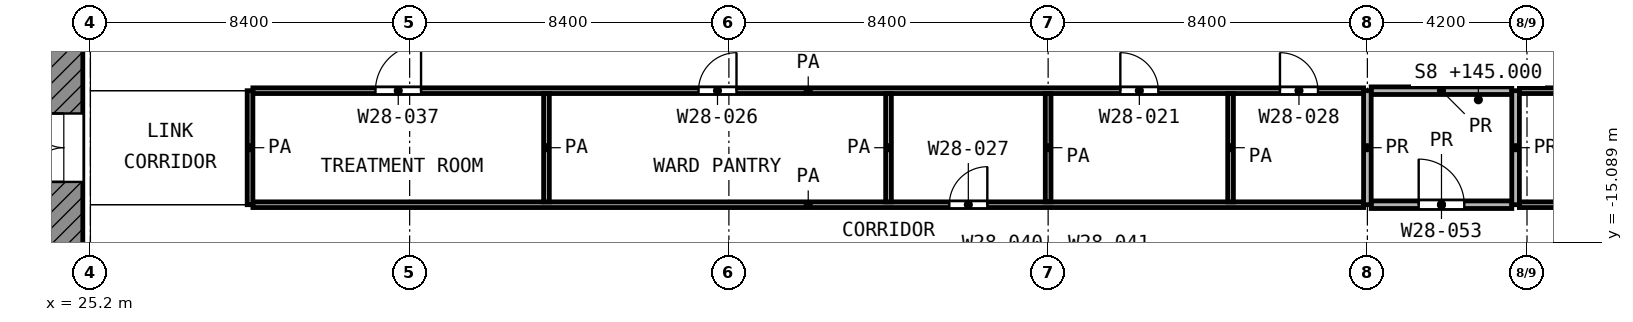
"""IFC4 building model, lengths in metres.
Left out: names, types, materials, properties, quantities, classifications, styles, units other than length and angle.
Written with IfcOpenShell. Run it as: python <this file> out.ifc"""

import sys

from ifc_helpers import new_model, si_unit, direction, frame, frame_2d, origin, place, context, subcontext, project, spatial, rectangle, extrude, element, fill, save


model = new_model("IFC4")
c1 = context("Model", 3, precision=1e-05, world=origin(), true_north=direction((0.0, 1.0)))
c2 = subcontext(c1, "Body", "Model", "MODEL_VIEW")
j1 = project(units=[si_unit("LENGTHUNIT", "METRE"), si_unit("PLANEANGLEUNIT", "RADIAN")], contexts=[c1])
p1 = place(None, origin())
s1 = spatial("IfcSite", under=j1, at=p1, CompositionType="ELEMENT")
p2 = place(p1, origin())
s2 = spatial("IfcBuilding", under=s1, at=p2, CompositionType="ELEMENT")
p3 = place(p2, frame((0.0, 0.0, 145.0)))
s3 = spatial("IfcBuildingStorey", under=s2, at=p3, CompositionType="ELEMENT", Elevation=145.0)
p4 = place(p3, frame((24.5, -24.0, 0.0), z_axis=(0.0, 0.0, 1.0), x_axis=(0.0, 1.0, 0.0)))
e1 = element("IfcWall", 1, at=p4, inside=s3, PredefinedType="SHEAR", context=c2, shape_type="SweptSolid", body=[
    extrude(rectangle(XDim=18.6, YDim=1.0, at=frame_2d((9.3, 0.0))), origin(), (0.0, 0.0, 1.0), 3.6),
])
p5 = place(p4, frame((10.5, 0.0, 0.0)))
e2 = element("IfcOpeningElement", 2, at=p5, cuts=e1, PredefinedType="OPENING", context=c2, shape_type="SweptSolid", body=[
    extrude(rectangle(XDim=1.8, YDim=2.1, at=frame_2d((0.9, 1.05))), frame((0.0, 0.51, 0.0), z_axis=(0.0, -1.0, 0.0), x_axis=(1.0, 0.0, 0.0)), (0.0, 0.0, 1.0), 1.02),
])
p6 = place(p3, frame((29.475, -14.1, 0.0), z_axis=(0.0, 0.0, 1.0), x_axis=(1.0, 0.0, 0.0)))
e3 = element("IfcWall", 3, at=p6, inside=s3, PredefinedType="PARTITIONING", context=c2, shape_type="SweptSolid", body=[
    extrude(rectangle(XDim=29.225, YDim=0.15, at=frame_2d((14.612, 0.0))), origin(), (0.0, 0.0, 1.0), 3.6),
])
p7 = place(p6, frame((18.325, 0.0, 0.0)))
e4 = element("IfcOpeningElement", 4, at=p7, cuts=e3, PredefinedType="OPENING", context=c2, shape_type="SweptSolid", body=[
    extrude(rectangle(XDim=1.0, YDim=2.1, at=frame_2d((0.5, 1.05))), frame((0.0, 0.085, 0.0), z_axis=(0.0, -1.0, 0.0), x_axis=(1.0, 0.0, 0.0)), (0.0, 0.0, 1.0), 0.17),
])
p8 = place(p3, frame((62.8, -14.1, 0.0), z_axis=(0.0, 0.0, 1.0), x_axis=(1.0, 0.0, 0.0)))
e5 = element("IfcWall", 5, at=p8, inside=s3, PredefinedType="PARTITIONING", context=c2, shape_type="SweptSolid", body=[
    extrude(rectangle(XDim=10.025, YDim=0.15, at=frame_2d((5.012, 0.0))), origin(), (0.0, 0.0, 1.0), 3.6),
])
p9 = place(p3, frame((29.475, -11.1, 0.0), z_axis=(0.0, 0.0, 1.0), x_axis=(1.0, 0.0, 0.0)))
e6 = element("IfcWall", 6, at=p9, inside=s3, PredefinedType="PARTITIONING", context=c2, shape_type="SweptSolid", body=[
    extrude(rectangle(XDim=29.225, YDim=0.15, at=frame_2d((14.612, 0.0))), origin(), (0.0, 0.0, 1.0), 3.6),
])
p10 = place(p9, frame((3.225, 0.0, 0.0)))
e7 = element("IfcOpeningElement", 7, at=p10, cuts=e6, PredefinedType="OPENING", context=c2, shape_type="SweptSolid", body=[
    extrude(rectangle(XDim=1.2, YDim=2.1, at=frame_2d((0.6, 1.05))), frame((0.0, 0.085, 0.0), z_axis=(0.0, -1.0, 0.0), x_axis=(1.0, 0.0, 0.0)), (0.0, 0.0, 1.0), 0.17),
])
p11 = place(p9, frame((11.725, 0.0, 0.0)))
e8 = element("IfcOpeningElement", 8, at=p11, cuts=e6, PredefinedType="OPENING", context=c2, shape_type="SweptSolid", body=[
    extrude(rectangle(XDim=1.0, YDim=2.1, at=frame_2d((0.5, 1.05))), frame((0.0, 0.085, 0.0), z_axis=(0.0, -1.0, 0.0), x_axis=(1.0, 0.0, 0.0)), (0.0, 0.0, 1.0), 0.17),
])
p12 = place(p9, frame((22.825, 0.0, 0.0)))
e9 = element("IfcOpeningElement", 9, at=p12, cuts=e6, PredefinedType="OPENING", context=c2, shape_type="SweptSolid", body=[
    extrude(rectangle(XDim=1.0, YDim=2.1, at=frame_2d((0.5, 1.05))), frame((0.0, 0.085, 0.0), z_axis=(0.0, -1.0, 0.0), x_axis=(1.0, 0.0, 0.0)), (0.0, 0.0, 1.0), 0.17),
])
p13 = place(p9, frame((27.025, 0.0, 0.0)))
e10 = element("IfcOpeningElement", 10, at=p13, cuts=e6, PredefinedType="OPENING", context=c2, shape_type="SweptSolid", body=[
    extrude(rectangle(XDim=1.0, YDim=2.1, at=frame_2d((0.5, 1.05))), frame((0.0, 0.085, 0.0), z_axis=(0.0, -1.0, 0.0), x_axis=(1.0, 0.0, 0.0)), (0.0, 0.0, 1.0), 0.17),
])
p14 = place(p3, frame((62.8, -11.1, 0.0), z_axis=(0.0, 0.0, 1.0), x_axis=(1.0, 0.0, 0.0)))
e11 = element("IfcWall", 11, at=p14, inside=s3, PredefinedType="PARTITIONING", context=c2, shape_type="SweptSolid", body=[
    extrude(rectangle(XDim=10.025, YDim=0.15, at=frame_2d((5.012, 0.0))), origin(), (0.0, 0.0, 1.0), 3.6),
])
p15 = place(p14, frame((4.4, 0.0, 0.0)))
e12 = element("IfcOpeningElement", 12, at=p15, cuts=e11, PredefinedType="OPENING", context=c2, shape_type="SweptSolid", body=[
    extrude(rectangle(XDim=1.2, YDim=2.1, at=frame_2d((0.6, 1.05))), frame((0.0, 0.085, 0.0), z_axis=(0.0, -1.0, 0.0), x_axis=(1.0, 0.0, 0.0)), (0.0, 0.0, 1.0), 0.17),
])
p16 = place(p3, frame((29.4, -14.1, 0.0), z_axis=(0.0, 0.0, 1.0), x_axis=(0.0, 1.0, 0.0)))
e13 = element("IfcWall", 13, at=p16, inside=s3, PredefinedType="PARTITIONING", context=c2, shape_type="SweptSolid", body=[
    extrude(rectangle(XDim=3.0, YDim=0.15, at=frame_2d((1.5, 0.0))), origin(), (0.0, 0.0, 1.0), 3.6),
])
for number, where, z_axis, x_axis in (
    (14, (37.2, -14.025, 0.0), (0.0, 0.0, 1.0), (0.0, 1.0, 0.0)),
    (15, (46.2, -14.025, 0.0), (0.0, 0.0, 1.0), (0.0, 1.0, 0.0)),
    (16, (50.4, -14.025, 0.0), (0.0, 0.0, 1.0), (0.0, 1.0, 0.0)),
    (17, (55.2, -14.025, 0.0), (0.0, 0.0, 1.0), (0.0, 1.0, 0.0)),
):
    element("IfcWall", number, at=place(p3, frame(where, z_axis=z_axis, x_axis=x_axis)), inside=s3, PredefinedType="PARTITIONING", context=c2, shape_type="SweptSolid", body=[
        extrude(rectangle(XDim=2.85, YDim=0.15, at=frame_2d((1.425, 0.0))), origin(), (0.0, 0.0, 1.0), 3.6),
    ])
p17 = place(p3, frame((58.9, -14.1, 0.0), z_axis=(0.0, 0.0, 1.0), x_axis=(1.0, 0.0, 0.0)))
e18 = element("IfcWall", 18, at=p17, inside=s3, PredefinedType="PARTITIONING", context=c2, shape_type="SweptSolid", body=[
    extrude(rectangle(XDim=3.7, YDim=0.2, at=frame_2d((1.85, 0.0))), origin(), (0.0, 0.0, 1.0), 3.6),
])
p18 = place(p17, frame((1.25, 0.0, 0.0)))
e19 = element("IfcOpeningElement", 19, at=p18, cuts=e18, PredefinedType="OPENING", context=c2, shape_type="SweptSolid", body=[
    extrude(rectangle(XDim=1.2, YDim=2.1, at=frame_2d((0.6, 1.05))), frame((0.0, 0.11, 0.0), z_axis=(0.0, -1.0, 0.0), x_axis=(1.0, 0.0, 0.0)), (0.0, 0.0, 1.0), 0.22),
])
p19 = place(p3, frame((58.9, -11.1, 0.0), z_axis=(0.0, 0.0, 1.0), x_axis=(1.0, 0.0, 0.0)))
e20 = element("IfcWall", 20, at=p19, inside=s3, PredefinedType="PARTITIONING", context=c2, shape_type="SweptSolid", body=[
    extrude(rectangle(XDim=3.7, YDim=0.2, at=frame_2d((1.85, 0.0))), origin(), (0.0, 0.0, 1.0), 3.6),
])
for number, where, z_axis, x_axis in (
    (21, (58.8, -14.1, 0.0), (0.0, 0.0, 1.0), (0.0, 1.0, 0.0)),
    (22, (62.7, -14.1, 0.0), (0.0, 0.0, 1.0), (0.0, 1.0, 0.0)),
):
    element("IfcWall", number, at=place(p3, frame(where, z_axis=z_axis, x_axis=x_axis)), inside=s3, PredefinedType="PARTITIONING", context=c2, shape_type="SweptSolid", body=[
        extrude(rectangle(XDim=3.0, YDim=0.2, at=frame_2d((1.5, 0.0))), origin(), (0.0, 0.0, 1.0), 3.6),
    ])
p20 = place(p5, origin())
e23 = element("IfcDoor", 23, at=p20, inside=s3, OperationType="DOUBLE_DOOR_SINGLE_SWING", PredefinedType="DOOR", context=c2, shape_type="SweptSolid", body=[
    extrude(rectangle(XDim=1.8, YDim=2.1, at=frame_2d((0.9, 1.05))), frame((0.0, 0.025, 0.0), z_axis=(0.0, -1.0, 0.0), x_axis=(1.0, 0.0, 0.0)), (0.0, 0.0, 1.0), 0.05),
])
fill(e2, e23)
p21 = place(p10, origin())
e24 = element("IfcDoor", 24, at=p21, inside=s3, OperationType="SINGLE_SWING_RIGHT", PredefinedType="DOOR", context=c2, shape_type="SweptSolid", body=[
    extrude(rectangle(XDim=1.2, YDim=2.1, at=frame_2d((0.6, 1.05))), frame((0.0, 0.025, 0.0), z_axis=(0.0, -1.0, 0.0), x_axis=(1.0, 0.0, 0.0)), (0.0, 0.0, 1.0), 0.05),
])
fill(e7, e24)
p22 = place(p11, origin())
e25 = element("IfcDoor", 25, at=p22, inside=s3, OperationType="SINGLE_SWING_RIGHT", PredefinedType="DOOR", context=c2, shape_type="SweptSolid", body=[
    extrude(rectangle(XDim=1.0, YDim=2.1, at=frame_2d((0.5, 1.05))), frame((0.0, 0.025, 0.0), z_axis=(0.0, -1.0, 0.0), x_axis=(1.0, 0.0, 0.0)), (0.0, 0.0, 1.0), 0.05),
])
fill(e8, e25)
p23 = place(p7, origin())
e26 = element("IfcDoor", 26, at=p23, inside=s3, OperationType="SINGLE_SWING_RIGHT", PredefinedType="DOOR", context=c2, shape_type="SweptSolid", body=[
    extrude(rectangle(XDim=1.0, YDim=2.1, at=frame_2d((0.5, 1.05))), frame((0.0, 0.025, 0.0), z_axis=(0.0, -1.0, 0.0), x_axis=(1.0, 0.0, 0.0)), (0.0, 0.0, 1.0), 0.05),
])
fill(e4, e26)
p24 = place(p12, origin())
e27 = element("IfcDoor", 27, at=p24, inside=s3, OperationType="SINGLE_SWING_LEFT", PredefinedType="DOOR", context=c2, shape_type="SweptSolid", body=[
    extrude(rectangle(XDim=1.0, YDim=2.1, at=frame_2d((0.5, 1.05))), frame((0.0, 0.025, 0.0), z_axis=(0.0, -1.0, 0.0), x_axis=(1.0, 0.0, 0.0)), (0.0, 0.0, 1.0), 0.05),
])
fill(e9, e27)
p25 = place(p13, origin())
e28 = element("IfcDoor", 28, at=p25, inside=s3, OperationType="SINGLE_SWING_LEFT", PredefinedType="DOOR", context=c2, shape_type="SweptSolid", body=[
    extrude(rectangle(XDim=1.0, YDim=2.1, at=frame_2d((0.5, 1.05))), frame((0.0, 0.025, 0.0), z_axis=(0.0, -1.0, 0.0), x_axis=(1.0, 0.0, 0.0)), (0.0, 0.0, 1.0), 0.05),
])
fill(e10, e28)
p26 = place(p18, origin())
e29 = element("IfcDoor", 29, at=p26, inside=s3, OperationType="SINGLE_SWING_LEFT", PredefinedType="DOOR", context=c2, shape_type="SweptSolid", body=[
    extrude(rectangle(XDim=1.2, YDim=2.1, at=frame_2d((0.6, 1.05))), frame((0.0, 0.025, 0.0), z_axis=(0.0, -1.0, 0.0), x_axis=(1.0, 0.0, 0.0)), (0.0, 0.0, 1.0), 0.05),
])
fill(e19, e29)
save(model, sys.argv[1])
